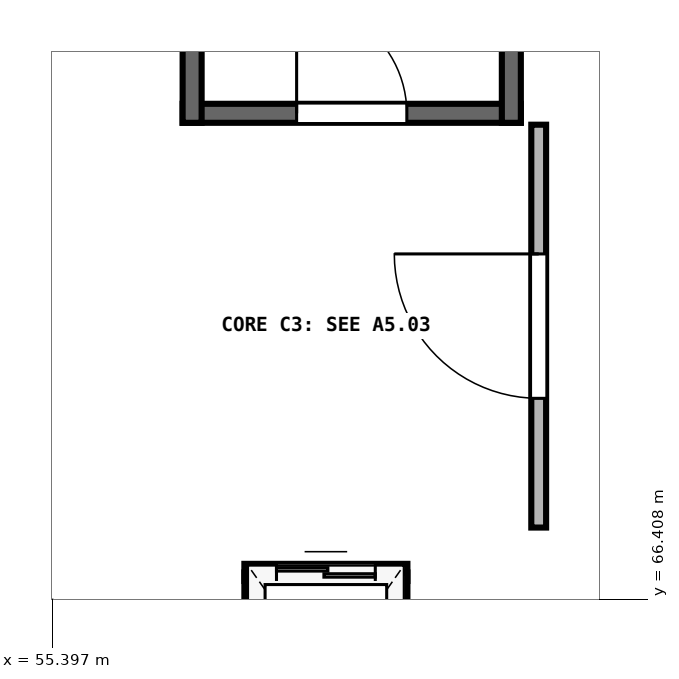
"""IFC4 building model, lengths in metres.
Left out: names, types, materials, properties, quantities, classifications, styles, units other than length and angle.
Written with IfcOpenShell. Run it as: python <this file> out.ifc"""

import sys

from ifc_helpers import new_model, si_unit, direction, frame, frame_2d, origin, place, context, subcontext, project, spatial, rectangle, extrude, element, fill, save


model = new_model("IFC4")
c1 = context("Model", 3, precision=1e-05, world=origin(), true_north=direction((0.0, 1.0)))
c2 = subcontext(c1, "Body", "Model", "MODEL_VIEW")
j1 = project(units=[si_unit("LENGTHUNIT", "METRE"), si_unit("PLANEANGLEUNIT", "RADIAN")], contexts=[c1])
p1 = place(None, origin())
s1 = spatial("IfcSite", under=j1, at=p1, CompositionType="ELEMENT")
p2 = place(p1, origin())
s2 = spatial("IfcBuilding", under=s1, at=p2, CompositionType="ELEMENT")
p3 = place(p2, frame((0.0, 0.0, 10.2)))
s3 = spatial("IfcBuildingStorey", under=s2, at=p3, CompositionType="ELEMENT", Elevation=10.2)
p4 = place(p3, frame((57.115, 72.8, 0.0), z_axis=(0.0, 0.0, 1.0), x_axis=(1.0, 0.0, 0.0)))
e1 = element("IfcWall", 1, at=p4, inside=s3, PredefinedType="SHEAR", context=c2, shape_type="SweptSolid", body=[
    extrude(rectangle(XDim=4.45, YDim=0.25, at=frame_2d((2.225, 0.0))), origin(), (0.0, 0.0, 1.0), 4.24),
])
p5 = place(p4, frame((1.5, 0.0, 0.0)))
e2 = element("IfcOpeningElement", 2, at=p5, cuts=e1, PredefinedType="OPENING", context=c2, shape_type="SweptSolid", body=[
    extrude(rectangle(XDim=1.45, YDim=2.2, at=frame_2d((0.725, 1.1))), frame((0.0, 0.135, 0.0), z_axis=(0.0, -1.0, 0.0), x_axis=(1.0, 0.0, 0.0)), (0.0, 0.0, 1.0), 0.27),
])
for number, where, z_axis, x_axis in (
    (3, (57.24, 72.675, 0.0), (0.0, 0.0, 1.0), (0.0, 1.0, 0.0)),
    (4, (61.44, 72.675, 0.0), (0.0, 0.0, 1.0), (0.0, 1.0, 0.0)),
):
    element("IfcWall", number, at=place(p3, frame(where, z_axis=z_axis, x_axis=x_axis)), inside=s3, PredefinedType="SHEAR", context=c2, shape_type="SweptSolid", body=[
        extrude(rectangle(XDim=11.09, YDim=0.25, at=frame_2d((5.545, 0.0))), origin(), (0.0, 0.0, 1.0), 4.24),
    ])
p6 = place(p3, frame((61.8, 67.35, 0.0), z_axis=(0.0, 0.0, 1.0), x_axis=(0.0, 1.0, 0.0)))
e5 = element("IfcWall", 5, at=p6, inside=s3, PredefinedType="PARTITIONING", context=c2, shape_type="SweptSolid", body=[
    extrude(rectangle(XDim=5.3, YDim=0.195, at=frame_2d((2.65, 0.0))), origin(), (0.0, 0.0, 1.0), 4.19),
])
p7 = place(p6, frame((1.7, 0.0, 0.0)))
e6 = element("IfcOpeningElement", 6, at=p7, cuts=e5, PredefinedType="OPENING", context=c2, shape_type="SweptSolid", body=[
    extrude(rectangle(XDim=1.9, YDim=2.3, at=frame_2d((0.95, 1.15))), frame((0.0, 0.107, 0.0), z_axis=(0.0, -1.0, 0.0), x_axis=(1.0, 0.0, 0.0)), (0.0, 0.0, 1.0), 0.215),
])
p8 = place(p3, frame((57.927, 66.76, 0.0), z_axis=(0.0, 0.0, 1.0), x_axis=(1.0, 0.0, 0.0)))
e7 = element("IfcWall", 7, at=p8, inside=s3, PredefinedType="SOLIDWALL", context=c2, shape_type="SweptSolid", body=[
    extrude(rectangle(XDim=2.145, YDim=0.225, at=frame_2d((1.073, 0.0))), origin(), (0.0, 0.0, 1.0), 4.19),
])
p9 = place(p8, frame((0.423, 0.0, 0.0)))
e8 = element("IfcOpeningElement", 8, at=p9, cuts=e7, PredefinedType="OPENING", context=c2, shape_type="SweptSolid", body=[
    extrude(rectangle(XDim=1.3, YDim=2.25, at=frame_2d((0.65, 1.125))), frame((0.0, 0.123, 0.0), z_axis=(0.0, -1.0, 0.0), x_axis=(1.0, 0.0, 0.0)), (0.0, 0.0, 1.0), 0.245),
])
for number, where, z_axis, x_axis in (
    (9, (58.04, 64.04, 0.0), (0.0, 0.0, 1.0), (0.0, 1.0, 0.0)),
    (10, (59.96, 64.04, 0.0), (0.0, 0.0, 1.0), (0.0, 1.0, 0.0)),
):
    element("IfcWall", number, at=place(p3, frame(where, z_axis=z_axis, x_axis=x_axis)), inside=s3, PredefinedType="SOLIDWALL", context=c2, shape_type="SweptSolid", body=[
        extrude(rectangle(XDim=2.72, YDim=0.225, at=frame_2d((1.36, 0.0))), origin(), (0.0, 0.0, 1.0), 4.19),
    ])
p10 = place(p5, origin())
e11 = element("IfcDoor", 11, at=p10, inside=s3, OperationType="SINGLE_SWING_LEFT", PredefinedType="DOOR", context=c2, shape_type="SweptSolid", body=[
    extrude(rectangle(XDim=1.45, YDim=2.2, at=frame_2d((0.725, 1.1))), frame((0.0, 0.025, 0.0), z_axis=(0.0, -1.0, 0.0), x_axis=(1.0, 0.0, 0.0)), (0.0, 0.0, 1.0), 0.05),
])
fill(e2, e11)
p11 = place(p7, origin())
e12 = element("IfcDoor", 12, at=p11, inside=s3, OperationType="SINGLE_SWING_RIGHT", PredefinedType="DOOR", context=c2, shape_type="SweptSolid", body=[
    extrude(rectangle(XDim=1.9, YDim=2.3, at=frame_2d((0.95, 1.15))), frame((0.0, 0.025, 0.0), z_axis=(0.0, -1.0, 0.0), x_axis=(1.0, 0.0, 0.0)), (0.0, 0.0, 1.0), 0.05),
])
fill(e6, e12)
p12 = place(p9, origin())
e13 = element("IfcDoor", 13, at=p12, inside=s3, OperationType="DOUBLE_DOOR_SLIDING", PredefinedType="DOOR", context=c2, shape_type="SweptSolid", body=[
    extrude(rectangle(XDim=1.3, YDim=2.25, at=frame_2d((0.65, 1.125))), frame((0.0, 0.025, 0.0), z_axis=(0.0, -1.0, 0.0), x_axis=(1.0, 0.0, 0.0)), (0.0, 0.0, 1.0), 0.05),
])
fill(e8, e13)
save(model, sys.argv[1])
